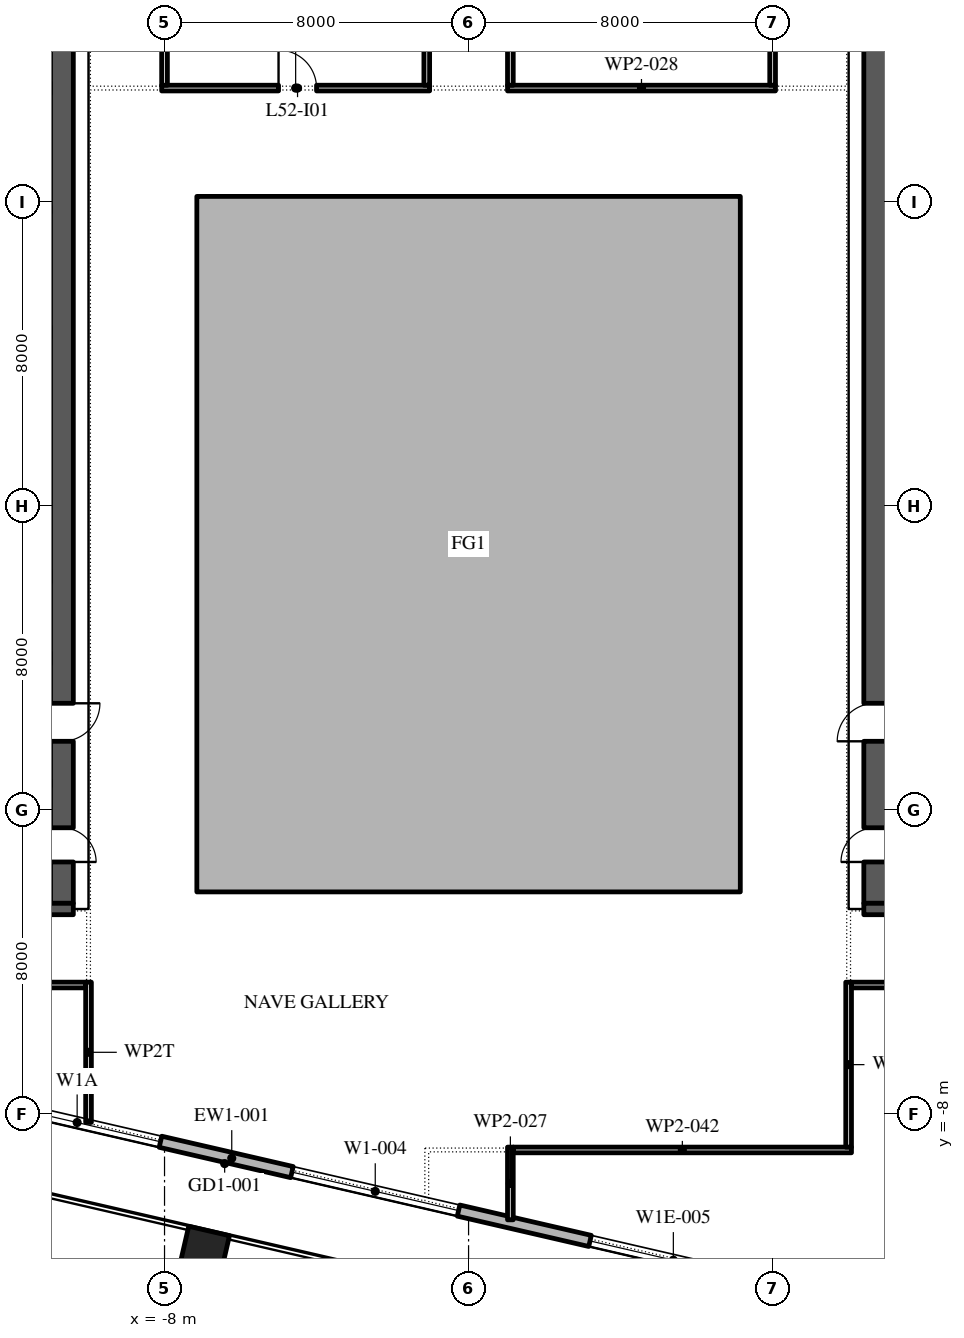
"""IFC4 building model, lengths in metres.
Left out: names, types, materials, properties, quantities, classifications, styles, units other than length and angle.
Written with IfcOpenShell. Run it as: python <this file> out.ifc"""

import sys

from ifc_helpers import new_model, si_unit, direction, frame, frame_2d, origin, origin_2d, place, context, subcontext, project, spatial, polyline, rectangle, outline, extrude, element, fill, save


model = new_model("IFC4")
c1 = context("Model", 3, precision=1e-05, world=origin(), true_north=direction((0.0, 1.0)))
c2 = subcontext(c1, "Body", "Model", "MODEL_VIEW")
j1 = project(units=[si_unit("LENGTHUNIT", "METRE"), si_unit("PLANEANGLEUNIT", "RADIAN")], contexts=[c1])
p1 = place(None, origin())
s1 = spatial("IfcSite", under=j1, at=p1, CompositionType="ELEMENT")
p2 = place(p1, origin())
s2 = spatial("IfcBuilding", under=s1, at=p2, CompositionType="ELEMENT")
p3 = place(p2, frame((0.0, 0.0, 243.0)))
s3 = spatial("IfcBuildingStorey", under=s2, at=p3, CompositionType="ELEMENT", Elevation=243.0)
p4 = place(p3, frame((-6.951, -11.608, 0.0), z_axis=(0.0, 0.0, 1.0), x_axis=(0.974370064785, -0.224951054344, 0.0)))
e1 = element("IfcColumn", 1, at=p4, inside=s3, PredefinedType="COLUMN", context=c2, shape_type="SweptSolid", body=[
    extrude(rectangle(XDim=1.1, YDim=1.1, at=origin_2d()), origin(), (0.0, 0.0, 1.0), 4.2),
])
p5 = place(p3, origin())
e2 = element("IfcWall", 2, at=p5, inside=s3, PredefinedType="STANDARD", context=c2, shape_type="SweptSolid", body=[
    extrude(outline(polyline([(-7.15, -2.15), (7.15, -2.15), (7.15, 16.15), (-7.15, 16.15), (-7.15, -2.15)]), holes=[polyline([(-7.0, -2.0), (-7.0, 16.0), (7.0, 16.0), (7.0, -2.0), (-7.0, -2.0)])]), origin(), (0.0, 0.0, 1.0), 4.0),
])
p6 = place(p3, frame((-29.616, -3.758, 0.0), z_axis=(0.0, 0.0, 1.0), x_axis=(0.974370532314, -0.224949029246, 0.0)))
e3 = element("IfcWall", 3, at=p6, inside=s3, PredefinedType="STANDARD", context=c2, shape_type="SweptSolid", body=[
    extrude(rectangle(XDim=48.0, YDim=0.3, at=frame_2d((24.0, 0.0))), origin(), (0.0, 0.0, 1.0), 4.0),
])
p7 = place(p6, frame((1.625, 0.0, 0.45)))
e4 = element("IfcOpeningElement", 4, at=p7, cuts=e3, PredefinedType="OPENING", context=c2, shape_type="SweptSolid", body=[
    extrude(rectangle(XDim=4.5, YDim=3.05, at=frame_2d((2.25, 1.525))), frame((0.0, 0.16, 0.0), z_axis=(0.0, -1.0, 0.0), x_axis=(1.0, 0.0, 0.0)), (0.0, 0.0, 1.0), 0.32),
])
p8 = place(p6, frame((10.575, 0.0, 0.0)))
e5 = element("IfcOpeningElement", 5, at=p8, cuts=e3, PredefinedType="OPENING", context=c2, shape_type="SweptSolid", body=[
    extrude(rectangle(XDim=2.4, YDim=3.5, at=frame_2d((1.2, 1.75))), frame((0.0, 0.16, 0.0), z_axis=(0.0, -1.0, 0.0), x_axis=(1.0, 0.0, 0.0)), (0.0, 0.0, 1.0), 0.32),
])
p9 = place(p6, frame((17.575, 0.0, 0.45)))
e6 = element("IfcOpeningElement", 6, at=p9, cuts=e3, PredefinedType="OPENING", context=c2, shape_type="SweptSolid", body=[
    extrude(rectangle(XDim=4.5, YDim=3.0, at=frame_2d((2.25, 1.5))), frame((0.0, 0.16, 0.0), z_axis=(0.0, -1.0, 0.0), x_axis=(1.0, 0.0, 0.0)), (0.0, 0.0, 1.0), 0.32),
])
p10 = place(p6, frame((25.625, 0.0, 0.45)))
e7 = element("IfcOpeningElement", 7, at=p10, cuts=e3, PredefinedType="OPENING", context=c2, shape_type="SweptSolid", body=[
    extrude(rectangle(XDim=4.5, YDim=3.05, at=frame_2d((2.25, 1.525))), frame((0.0, 0.16, 0.0), z_axis=(0.0, -1.0, 0.0), x_axis=(1.0, 0.0, 0.0)), (0.0, 0.0, 1.0), 0.32),
])
p11 = place(p6, frame((33.675, 0.0, 0.45)))
e8 = element("IfcOpeningElement", 8, at=p11, cuts=e3, PredefinedType="OPENING", context=c2, shape_type="SweptSolid", body=[
    extrude(rectangle(XDim=4.5, YDim=2.825, at=frame_2d((2.25, 1.413))), frame((0.0, 0.16, 0.0), z_axis=(0.0, -1.0, 0.0), x_axis=(1.0, 0.0, 0.0)), (0.0, 0.0, 1.0), 0.32),
])
p12 = place(p6, frame((42.775, 0.0, 0.0)))
e9 = element("IfcOpeningElement", 9, at=p12, cuts=e3, PredefinedType="OPENING", context=c2, shape_type="SweptSolid", body=[
    extrude(rectangle(XDim=2.4, YDim=3.5, at=frame_2d((1.2, 1.75))), frame((0.0, 0.16, 0.0), z_axis=(0.0, -1.0, 0.0), x_axis=(1.0, 0.0, 0.0)), (0.0, 0.0, 1.0), 0.32),
])
p13 = place(p3, frame((-10.7, -2.45, 0.0), z_axis=(0.0, 0.0, 1.0), x_axis=(0.0, 1.0, 0.0)))
e10 = element("IfcWall", 10, at=p13, inside=s3, PredefinedType="SHEAR", context=c2, shape_type="SweptSolid", body=[
    extrude(rectangle(XDim=27.9, YDim=0.6, at=frame_2d((13.95, 0.0))), origin(), (0.0, 0.0, 1.0), 4.0),
])
p14 = place(p13, frame((23.65, 0.0, 0.0)))
e11 = element("IfcOpeningElement", 11, at=p14, cuts=e10, PredefinedType="OPENING", context=c2, shape_type="SweptSolid", body=[
    extrude(rectangle(XDim=2.4, YDim=2.1, at=frame_2d((1.2, 1.05))), frame((0.0, 0.31, 0.0), z_axis=(0.0, -1.0, 0.0), x_axis=(1.0, 0.0, 0.0)), (0.0, 0.0, 1.0), 0.62),
])
p15 = place(p13, frame((1.087, 0.0, 0.0)))
e12 = element("IfcOpeningElement", 12, at=p15, cuts=e10, PredefinedType="OPENING", context=c2, shape_type="SweptSolid", body=[
    extrude(rectangle(XDim=0.9, YDim=2.1, at=frame_2d((0.45, 1.05))), frame((0.0, 0.31, 0.0), z_axis=(0.0, -1.0, 0.0), x_axis=(1.0, 0.0, 0.0)), (0.0, 0.0, 1.0), 0.62),
])
p16 = place(p13, frame((4.262, 0.0, 0.0)))
e13 = element("IfcOpeningElement", 13, at=p16, cuts=e10, PredefinedType="OPENING", context=c2, shape_type="SweptSolid", body=[
    extrude(rectangle(XDim=1.0, YDim=2.1, at=frame_2d((0.5, 1.05))), frame((0.0, 0.31, 0.0), z_axis=(0.0, -1.0, 0.0), x_axis=(1.0, 0.0, 0.0)), (0.0, 0.0, 1.0), 0.62),
])
p17 = place(p3, frame((-21.6, -2.6, 0.0), z_axis=(0.0, 0.0, 1.0), x_axis=(1.0, 0.0, 0.0)))
e14 = element("IfcWall", 14, at=p17, inside=s3, PredefinedType="SHEAR", context=c2, shape_type="SweptSolid", body=[
    extrude(rectangle(XDim=11.2, YDim=0.3, at=frame_2d((5.6, 0.0))), origin(), (0.0, 0.0, 1.0), 4.0),
])
p18 = place(p3, frame((10.7, -2.45, 0.0), z_axis=(0.0, 0.0, 1.0), x_axis=(0.0, 1.0, 0.0)))
e15 = element("IfcWall", 15, at=p18, inside=s3, PredefinedType="SHEAR", context=c2, shape_type="SweptSolid", body=[
    extrude(rectangle(XDim=27.9, YDim=0.6, at=frame_2d((13.95, 0.0))), origin(), (0.0, 0.0, 1.0), 4.0),
])
p19 = place(p18, frame((23.65, 0.0, 0.0)))
e16 = element("IfcOpeningElement", 16, at=p19, cuts=e15, PredefinedType="OPENING", context=c2, shape_type="SweptSolid", body=[
    extrude(rectangle(XDim=2.4, YDim=2.1, at=frame_2d((1.2, 1.05))), frame((0.0, 0.31, 0.0), z_axis=(0.0, -1.0, 0.0), x_axis=(1.0, 0.0, 0.0)), (0.0, 0.0, 1.0), 0.62),
])
p20 = place(p18, frame((1.087, 0.0, 0.0)))
e17 = element("IfcOpeningElement", 17, at=p20, cuts=e15, PredefinedType="OPENING", context=c2, shape_type="SweptSolid", body=[
    extrude(rectangle(XDim=0.9, YDim=2.1, at=frame_2d((0.45, 1.05))), frame((0.0, 0.31, 0.0), z_axis=(0.0, -1.0, 0.0), x_axis=(1.0, 0.0, 0.0)), (0.0, 0.0, 1.0), 0.62),
])
p21 = place(p18, frame((4.262, 0.0, 0.0)))
e18 = element("IfcOpeningElement", 18, at=p21, cuts=e15, PredefinedType="OPENING", context=c2, shape_type="SweptSolid", body=[
    extrude(rectangle(XDim=1.0, YDim=2.1, at=frame_2d((0.5, 1.05))), frame((0.0, 0.31, 0.0), z_axis=(0.0, -1.0, 0.0), x_axis=(1.0, 0.0, 0.0)), (0.0, 0.0, 1.0), 0.62),
])
p22 = place(p3, frame((10.4, -2.6, 0.0), z_axis=(0.0, 0.0, 1.0), x_axis=(1.0, 0.0, 0.0)))
e19 = element("IfcWall", 19, at=p22, inside=s3, PredefinedType="SHEAR", context=c2, shape_type="SweptSolid", body=[
    extrude(rectangle(XDim=11.2, YDim=0.3, at=frame_2d((5.6, 0.0))), origin(), (0.0, 0.0, 1.0), 4.0),
])
p23 = place(p3, frame((-10.0, -8.216, 0.0), z_axis=(0.0, 0.0, 1.0), x_axis=(0.0, 1.0, 0.0)))
e20 = element("IfcWall", 20, at=p23, inside=s3, PredefinedType="PARTITIONING", context=c2, shape_type="SweptSolid", body=[
    extrude(rectangle(XDim=3.691, YDim=0.15, at=frame_2d((1.846, 0.0))), origin(), (0.0, 0.0, 1.0), 3.594),
])
p24 = place(p3, frame((-10.075, -4.6, 0.0), z_axis=(0.0, 0.0, 1.0), x_axis=(-1.0, 0.0, 0.0)))
e21 = element("IfcWall", 21, at=p24, inside=s3, PredefinedType="PARTITIONING", context=c2, shape_type="SweptSolid", body=[
    extrude(rectangle(XDim=11.86, YDim=0.15, at=frame_2d((5.93, 0.0))), origin(), (0.0, 0.0, 1.0), 4.0),
])
p25 = place(p3, frame((-8.075, 19.0, 0.0), z_axis=(0.0, 0.0, 1.0), x_axis=(1.0, 0.0, 0.0)))
e22 = element("IfcWall", 22, at=p25, inside=s3, PredefinedType="PARTITIONING", context=c2, shape_type="SweptSolid", body=[
    extrude(rectangle(XDim=7.05, YDim=0.15, at=frame_2d((3.525, 0.0))), origin(), (0.0, 0.0, 1.0), 4.0),
])
p26 = place(p25, frame((3.075, 0.0, 0.0)))
e23 = element("IfcOpeningElement", 23, at=p26, cuts=e22, PredefinedType="OPENING", context=c2, shape_type="SweptSolid", body=[
    extrude(rectangle(XDim=1.0, YDim=2.1, at=frame_2d((0.5, 1.05))), frame((0.0, 0.085, 0.0), z_axis=(0.0, -1.0, 0.0), x_axis=(1.0, 0.0, 0.0)), (0.0, 0.0, 1.0), 0.17),
])
p27 = place(p3, frame((-8.0, 25.0, 0.0), z_axis=(0.0, 0.0, 1.0), x_axis=(0.0, -1.0, 0.0)))
e24 = element("IfcWall", 24, at=p27, inside=s3, PredefinedType="PARTITIONING", context=c2, shape_type="SweptSolid", body=[
    extrude(rectangle(XDim=5.925, YDim=0.15, at=frame_2d((2.962, 0.0))), origin(), (0.0, 0.0, 1.0), 4.0),
])
p28 = place(p3, frame((-1.1, 19.075, 0.0), z_axis=(0.0, 0.0, 1.0), x_axis=(0.0, 1.0, 0.0)))
e25 = element("IfcWall", 25, at=p28, inside=s3, PredefinedType="PARTITIONING", context=c2, shape_type="SweptSolid", body=[
    extrude(rectangle(XDim=5.875, YDim=0.15, at=frame_2d((2.938, 0.0))), origin(), (0.0, 0.0, 1.0), 4.0),
])
p29 = place(p3, frame((1.1, -8.865, 0.0), z_axis=(0.0, 0.0, 1.0), x_axis=(0.0, -1.0, 0.0)))
e26 = element("IfcWall", 26, at=p29, inside=s3, PredefinedType="PARTITIONING", context=c2, shape_type="SweptSolid", body=[
    extrude(rectangle(XDim=1.913, YDim=0.15, at=frame_2d((0.957, 0.0))), origin(), (0.0, 0.0, 1.0), 4.0),
])
p30 = place(p3, frame((1.025, 19.0, 0.0), z_axis=(0.0, 0.0, 1.0), x_axis=(1.0, 0.0, 0.0)))
e27 = element("IfcWall", 27, at=p30, inside=s3, PredefinedType="PARTITIONING", context=c2, shape_type="SweptSolid", body=[
    extrude(rectangle(XDim=7.05, YDim=0.15, at=frame_2d((3.525, 0.0))), origin(), (0.0, 0.0, 1.0), 4.0),
])
p31 = place(p3, frame((1.1, 28.05, 0.0), z_axis=(0.0, 0.0, 1.0), x_axis=(0.0, -1.0, 0.0)))
e28 = element("IfcWall", 28, at=p31, inside=s3, PredefinedType="PARTITIONING", context=c2, shape_type="SweptSolid", body=[
    extrude(rectangle(XDim=8.975, YDim=0.15, at=frame_2d((4.488, 0.0))), origin(), (0.0, 0.0, 1.0), 4.0),
])
p32 = place(p3, frame((8.0, 19.075, 0.0), z_axis=(0.0, 0.0, 1.0), x_axis=(0.0, 1.0, 0.0)))
e29 = element("IfcWall", 29, at=p32, inside=s3, PredefinedType="PARTITIONING", context=c2, shape_type="SweptSolid", body=[
    extrude(rectangle(XDim=8.875, YDim=0.15, at=frame_2d((4.438, 0.0))), origin(), (0.0, 0.0, 1.0), 4.0),
])
p33 = place(p32, frame((4.775, 0.0, 0.0)))
e30 = element("IfcOpeningElement", 30, at=p33, cuts=e29, PredefinedType="OPENING", context=c2, shape_type="SweptSolid", body=[
    extrude(rectangle(XDim=1.0, YDim=2.1, at=frame_2d((0.5, 1.05))), frame((0.0, 0.085, 0.0), z_axis=(0.0, -1.0, 0.0), x_axis=(1.0, 0.0, 0.0)), (0.0, 0.0, 1.0), 0.17),
])
p34 = place(p3, frame((10.075, -8.94, 0.0), z_axis=(0.0, 0.0, 1.0), x_axis=(-1.0, 0.0, 0.0)))
e31 = element("IfcWall", 31, at=p34, inside=s3, PredefinedType="PARTITIONING", context=c2, shape_type="SweptSolid", body=[
    extrude(rectangle(XDim=8.9, YDim=0.15, at=frame_2d((4.45, 0.0))), origin(), (0.0, 0.0, 1.0), 4.0),
])
p35 = place(p3, frame((10.0, -4.525, 0.0), z_axis=(0.0, 0.0, 1.0), x_axis=(0.0, -1.0, 0.0)))
e32 = element("IfcWall", 32, at=p35, inside=s3, PredefinedType="PARTITIONING", context=c2, shape_type="SweptSolid", body=[
    extrude(rectangle(XDim=4.34, YDim=0.15, at=frame_2d((2.17, 0.0))), origin(), (0.0, 0.0, 1.0), 4.0),
])
p36 = place(p3, frame((22.922, -4.6, 0.0), z_axis=(0.0, 0.0, 1.0), x_axis=(-1.0, 0.0, 0.0)))
e33 = element("IfcWall", 33, at=p36, inside=s3, PredefinedType="PARTITIONING", context=c2, shape_type="SweptSolid", body=[
    extrude(rectangle(XDim=12.847, YDim=0.15, at=frame_2d((6.424, 0.0))), origin(), (0.0, 0.0, 1.0), 4.0),
])
p37 = place(p36, frame((8.522, 0.0, 0.0)))
e34 = element("IfcOpeningElement", 34, at=p37, cuts=e33, PredefinedType="OPENING", context=c2, shape_type="SweptSolid", body=[
    extrude(rectangle(XDim=1.0, YDim=2.1, at=frame_2d((0.5, 1.05))), frame((0.0, 0.085, 0.0), z_axis=(0.0, -1.0, 0.0), x_axis=(1.0, 0.0, 0.0)), (0.0, 0.0, 1.0), 0.17),
])
p38 = place(p9, origin())
e35 = element("IfcWindow", 35, at=p38, inside=s3, PartitioningType="DOUBLE_PANEL_VERTICAL", PredefinedType="WINDOW", context=c2, shape_type="SweptSolid", body=[
    extrude(rectangle(XDim=4.5, YDim=3.0, at=frame_2d((2.25, 1.5))), frame((0.0, 0.03, 0.0), z_axis=(0.0, -1.0, 0.0), x_axis=(1.0, 0.0, 0.0)), (0.0, 0.0, 1.0), 0.06),
])
fill(e6, e35)
p39 = place(p10, origin())
e36 = element("IfcWindow", 36, at=p39, inside=s3, PartitioningType="DOUBLE_PANEL_VERTICAL", PredefinedType="WINDOW", context=c2, shape_type="SweptSolid", body=[
    extrude(rectangle(XDim=4.5, YDim=3.05, at=frame_2d((2.25, 1.525))), frame((0.0, 0.03, 0.0), z_axis=(0.0, -1.0, 0.0), x_axis=(1.0, 0.0, 0.0)), (0.0, 0.0, 1.0), 0.06),
])
fill(e7, e36)
p40 = place(p11, origin())
e37 = element("IfcWindow", 37, at=p40, inside=s3, PartitioningType="DOUBLE_PANEL_VERTICAL", PredefinedType="WINDOW", context=c2, shape_type="SweptSolid", body=[
    extrude(rectangle(XDim=4.5, YDim=2.825, at=frame_2d((2.25, 1.413))), frame((0.0, 0.03, 0.0), z_axis=(0.0, -1.0, 0.0), x_axis=(1.0, 0.0, 0.0)), (0.0, 0.0, 1.0), 0.06),
])
fill(e8, e37)
p41 = place(p26, origin())
e38 = element("IfcDoor", 38, at=p41, inside=s3, OperationType="SINGLE_SWING_RIGHT", PredefinedType="DOOR", context=c2, shape_type="SweptSolid", body=[
    extrude(rectangle(XDim=1.0, YDim=2.1, at=frame_2d((0.5, 1.05))), frame((0.0, 0.025, 0.0), z_axis=(0.0, -1.0, 0.0), x_axis=(1.0, 0.0, 0.0)), (0.0, 0.0, 1.0), 0.05),
])
fill(e23, e38)
save(model, sys.argv[1])
